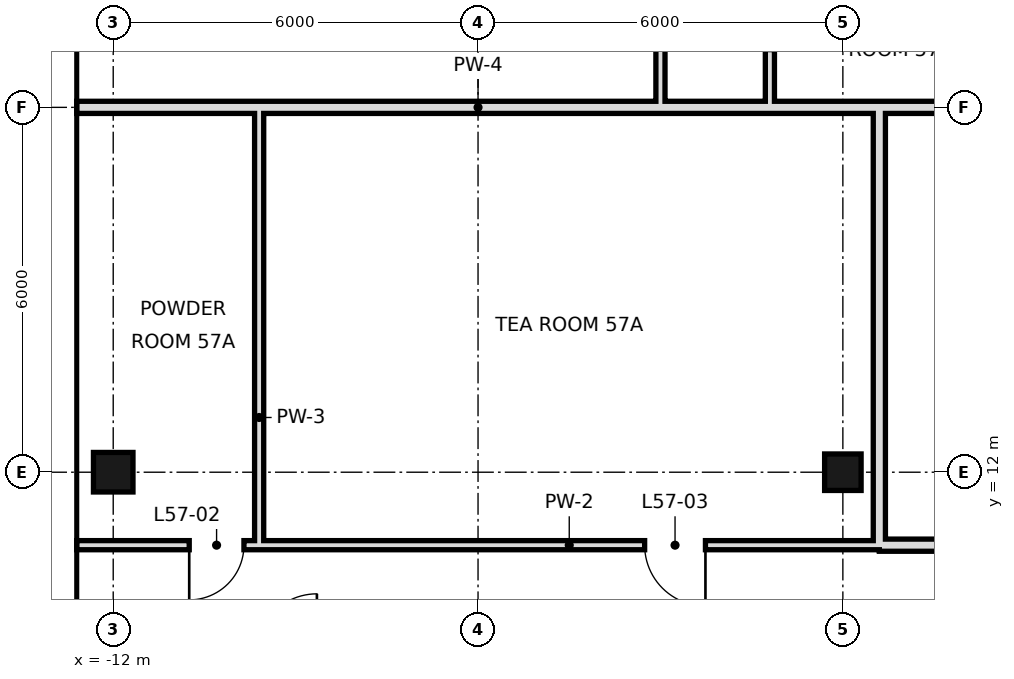
"""IFC4 building model, lengths in metres.
Left out: names, types, materials, properties, quantities, classifications, styles, units other than length and angle.
Written with IfcOpenShell. Run it as: python <this file> out.ifc"""

import sys

from ifc_helpers import new_model, si_unit, direction, frame, frame_2d, origin, origin_2d, place, context, subcontext, project, spatial, rectangle, hollow_rectangle, extrude, element, fill, save


model = new_model("IFC4")
c1 = context("Model", 3, precision=1e-05, world=origin(), true_north=direction((0.0, 1.0)))
c2 = subcontext(c1, "Body", "Model", "MODEL_VIEW")
j1 = project(units=[si_unit("LENGTHUNIT", "METRE"), si_unit("PLANEANGLEUNIT", "RADIAN")], contexts=[c1])
p1 = place(None, origin())
s1 = spatial("IfcSite", under=j1, at=p1, CompositionType="ELEMENT")
p2 = place(p1, origin())
s2 = spatial("IfcBuilding", under=s1, at=p2, CompositionType="ELEMENT")
p3 = place(p2, frame((0.0, 0.0, 243.2)))
s3 = spatial("IfcBuildingStorey", under=s2, at=p3, CompositionType="ELEMENT", Elevation=243.2)
p4 = place(p3, frame((-12.0, 12.0, 0.0), z_axis=(0.0, 0.0, 1.0), x_axis=(1.0, 0.0, 0.0)))
e1 = element("IfcColumn", 1, at=p4, inside=s3, PredefinedType="COLUMN", context=c2, shape_type="SweptSolid", body=[
    extrude(hollow_rectangle(XDim=0.65, YDim=0.65, WallThickness=0.032, at=origin_2d()), origin(), (0.0, 0.0, 1.0), 3.6),
])
p5 = place(p3, frame((0.0, 12.0, 0.0), z_axis=(0.0, 0.0, 1.0), x_axis=(1.0, 0.0, 0.0)))
e2 = element("IfcColumn", 2, at=p5, inside=s3, PredefinedType="COLUMN", context=c2, shape_type="SweptSolid", body=[
    extrude(hollow_rectangle(XDim=0.6, YDim=0.6, WallThickness=0.028, at=origin_2d()), origin(), (0.0, 0.0, 1.0), 3.6),
])
p6 = place(p3, frame((-1.2, 18.0, 0.0), z_axis=(0.0, 0.0, 1.0), x_axis=(0.0, 1.0, 0.0)))
e3 = element("IfcWall", 3, at=p6, inside=s3, PredefinedType="PARTITIONING", context=c2, shape_type="SweptSolid", body=[
    extrude(rectangle(XDim=2.4, YDim=0.15, at=frame_2d((1.2, 0.0))), origin(), (0.0, 0.0, 1.0), 3.42),
])
p7 = place(p6, frame((0.95, 0.0, 0.0)))
e4 = element("IfcOpeningElement", 4, at=p7, cuts=e3, PredefinedType="OPENING", context=c2, shape_type="SweptSolid", body=[
    extrude(rectangle(XDim=0.9, YDim=2.4, at=frame_2d((0.45, 1.2))), frame((0.0, 0.085, 0.0), z_axis=(0.0, -1.0, 0.0), x_axis=(1.0, 0.0, 0.0)), (0.0, 0.0, 1.0), 0.17),
])
p8 = place(p3, frame((-3.0, 18.0, 0.0), z_axis=(0.0, 0.0, 1.0), x_axis=(0.0, 1.0, 0.0)))
e5 = element("IfcWall", 5, at=p8, inside=s3, PredefinedType="PARTITIONING", context=c2, shape_type="SweptSolid", body=[
    extrude(rectangle(XDim=18.0, YDim=0.15, at=frame_2d((9.0, 0.0))), origin(), (0.0, 0.0, 1.0), 3.42),
])
p9 = place(p8, frame((2.1, 0.0, 0.0)))
e6 = element("IfcOpeningElement", 6, at=p9, cuts=e5, PredefinedType="OPENING", context=c2, shape_type="SweptSolid", body=[
    extrude(rectangle(XDim=1.8, YDim=2.4, at=frame_2d((0.9, 1.2))), frame((0.0, 0.085, 0.0), z_axis=(0.0, -1.0, 0.0), x_axis=(1.0, 0.0, 0.0)), (0.0, 0.0, 1.0), 0.17),
])
p10 = place(p8, frame((13.04, 0.0, 0.0)))
e7 = element("IfcOpeningElement", 7, at=p10, cuts=e5, PredefinedType="OPENING", context=c2, shape_type="SweptSolid", body=[
    extrude(rectangle(XDim=1.8, YDim=2.4, at=frame_2d((0.9, 1.2))), frame((0.0, 0.085, 0.0), z_axis=(0.0, -1.0, 0.0), x_axis=(1.0, 0.0, 0.0)), (0.0, 0.0, 1.0), 0.17),
])
p11 = place(p3, frame((-9.6, 10.8, 0.0), z_axis=(0.0, 0.0, 1.0), x_axis=(0.0, 1.0, 0.0)))
e8 = element("IfcWall", 8, at=p11, inside=s3, PredefinedType="PARTITIONING", context=c2, shape_type="SweptSolid", body=[
    extrude(rectangle(XDim=7.2, YDim=0.15, at=frame_2d((3.6, 0.0))), origin(), (0.0, 0.0, 1.0), 3.42),
])
p12 = place(p3, frame((0.6, 10.8, 0.0), z_axis=(0.0, 0.0, 1.0), x_axis=(0.0, 1.0, 0.0)))
e9 = element("IfcWall", 9, at=p12, inside=s3, PredefinedType="SOLIDWALL", context=c2, shape_type="SweptSolid", body=[
    extrude(rectangle(XDim=7.2, YDim=0.2, at=frame_2d((3.6, 0.0))), origin(), (0.0, 0.0, 1.0), 2.72),
])
p13 = place(p3, frame((0.6, 10.8, 0.0), z_axis=(0.0, 0.0, 1.0), x_axis=(1.0, 0.0, 0.0)))
e10 = element("IfcWall", 10, at=p13, inside=s3, PredefinedType="SOLIDWALL", context=c2, shape_type="SweptSolid", body=[
    extrude(rectangle(XDim=5.4, YDim=0.2, at=frame_2d((2.7, 0.0))), origin(), (0.0, 0.0, 1.0), 2.72),
])
p14 = place(p13, frame((2.2, 0.0, 0.0)))
e11 = element("IfcOpeningElement", 11, at=p14, cuts=e10, PredefinedType="OPENING", context=c2, shape_type="SweptSolid", body=[
    extrude(rectangle(XDim=1.0, YDim=2.4, at=frame_2d((0.5, 1.2))), frame((0.0, 0.11, 0.0), z_axis=(0.0, -1.0, 0.0), x_axis=(1.0, 0.0, 0.0)), (0.0, 0.0, 1.0), 0.22),
])
p15 = place(p3, frame((-9.6, 10.8, 0.0), z_axis=(0.0, 0.0, 1.0), x_axis=(1.0, 0.0, 0.0)))
e12 = element("IfcWall", 12, at=p15, inside=s3, PredefinedType="PARTITIONING", context=c2, shape_type="SweptSolid", body=[
    extrude(rectangle(XDim=10.2, YDim=0.15, at=frame_2d((5.1, 0.0))), origin(), (0.0, 0.0, 1.0), 3.42),
])
p16 = place(p15, frame((6.34, 0.0, 0.0)))
e13 = element("IfcOpeningElement", 13, at=p16, cuts=e12, PredefinedType="OPENING", context=c2, shape_type="SweptSolid", body=[
    extrude(rectangle(XDim=1.0, YDim=2.4, at=frame_2d((0.5, 1.2))), frame((0.0, 0.085, 0.0), z_axis=(0.0, -1.0, 0.0), x_axis=(1.0, 0.0, 0.0)), (0.0, 0.0, 1.0), 0.17),
])
p17 = place(p3, frame((-12.6, 10.8, 0.0), z_axis=(0.0, 0.0, 1.0), x_axis=(1.0, 0.0, 0.0)))
e14 = element("IfcWall", 14, at=p17, inside=s3, PredefinedType="PARTITIONING", context=c2, shape_type="SweptSolid", body=[
    extrude(rectangle(XDim=3.0, YDim=0.15, at=frame_2d((1.5, 0.0))), origin(), (0.0, 0.0, 1.0), 3.42),
])
p18 = place(p17, frame((1.85, 0.0, 0.0)))
e15 = element("IfcOpeningElement", 15, at=p18, cuts=e14, PredefinedType="OPENING", context=c2, shape_type="SweptSolid", body=[
    extrude(rectangle(XDim=0.9, YDim=2.4, at=frame_2d((0.45, 1.2))), frame((0.0, 0.085, 0.0), z_axis=(0.0, -1.0, 0.0), x_axis=(1.0, 0.0, 0.0)), (0.0, 0.0, 1.0), 0.17),
])
p19 = place(p3, frame((0.6, 18.0, 0.0), z_axis=(0.0, 0.0, 1.0), x_axis=(1.0, 0.0, 0.0)))
e16 = element("IfcWall", 16, at=p19, inside=s3, PredefinedType="SOLIDWALL", context=c2, shape_type="SweptSolid", body=[
    extrude(rectangle(XDim=2.5, YDim=0.2, at=frame_2d((1.25, 0.0))), origin(), (0.0, 0.0, 1.0), 2.97),
])
p20 = place(p3, frame((-12.6, 18.0, 0.0), z_axis=(0.0, 0.0, 1.0), x_axis=(1.0, 0.0, 0.0)))
e17 = element("IfcWall", 17, at=p20, inside=s3, PredefinedType="SOLIDWALL", context=c2, shape_type="SweptSolid", body=[
    extrude(rectangle(XDim=13.2, YDim=0.2, at=frame_2d((6.6, 0.0))), origin(), (0.0, 0.0, 1.0), 2.72),
])
p21 = place(p18, frame((0.9, 0.0, 0.0), z_axis=(0.0, 0.0, 1.0), x_axis=(-1.0, 0.0, 0.0)))
e18 = element("IfcDoor", 18, at=p21, inside=s3, OperationType="SINGLE_SWING_RIGHT", PredefinedType="DOOR", context=c2, shape_type="SweptSolid", body=[
    extrude(rectangle(XDim=0.9, YDim=2.4, at=frame_2d((0.45, 1.2))), frame((0.0, 0.025, 0.0), z_axis=(0.0, -1.0, 0.0), x_axis=(1.0, 0.0, 0.0)), (0.0, 0.0, 1.0), 0.05),
])
fill(e15, e18)
p22 = place(p16, origin())
e19 = element("IfcDoor", 19, at=p22, inside=s3, OperationType="SINGLE_SWING_RIGHT", PredefinedType="DOOR", context=c2, shape_type="SweptSolid", body=[
    extrude(rectangle(XDim=1.0, YDim=2.4, at=frame_2d((0.5, 1.2))), frame((0.0, 0.025, 0.0), z_axis=(0.0, -1.0, 0.0), x_axis=(1.0, 0.0, 0.0)), (0.0, 0.0, 1.0), 0.05),
])
fill(e13, e19)
save(model, sys.argv[1])
